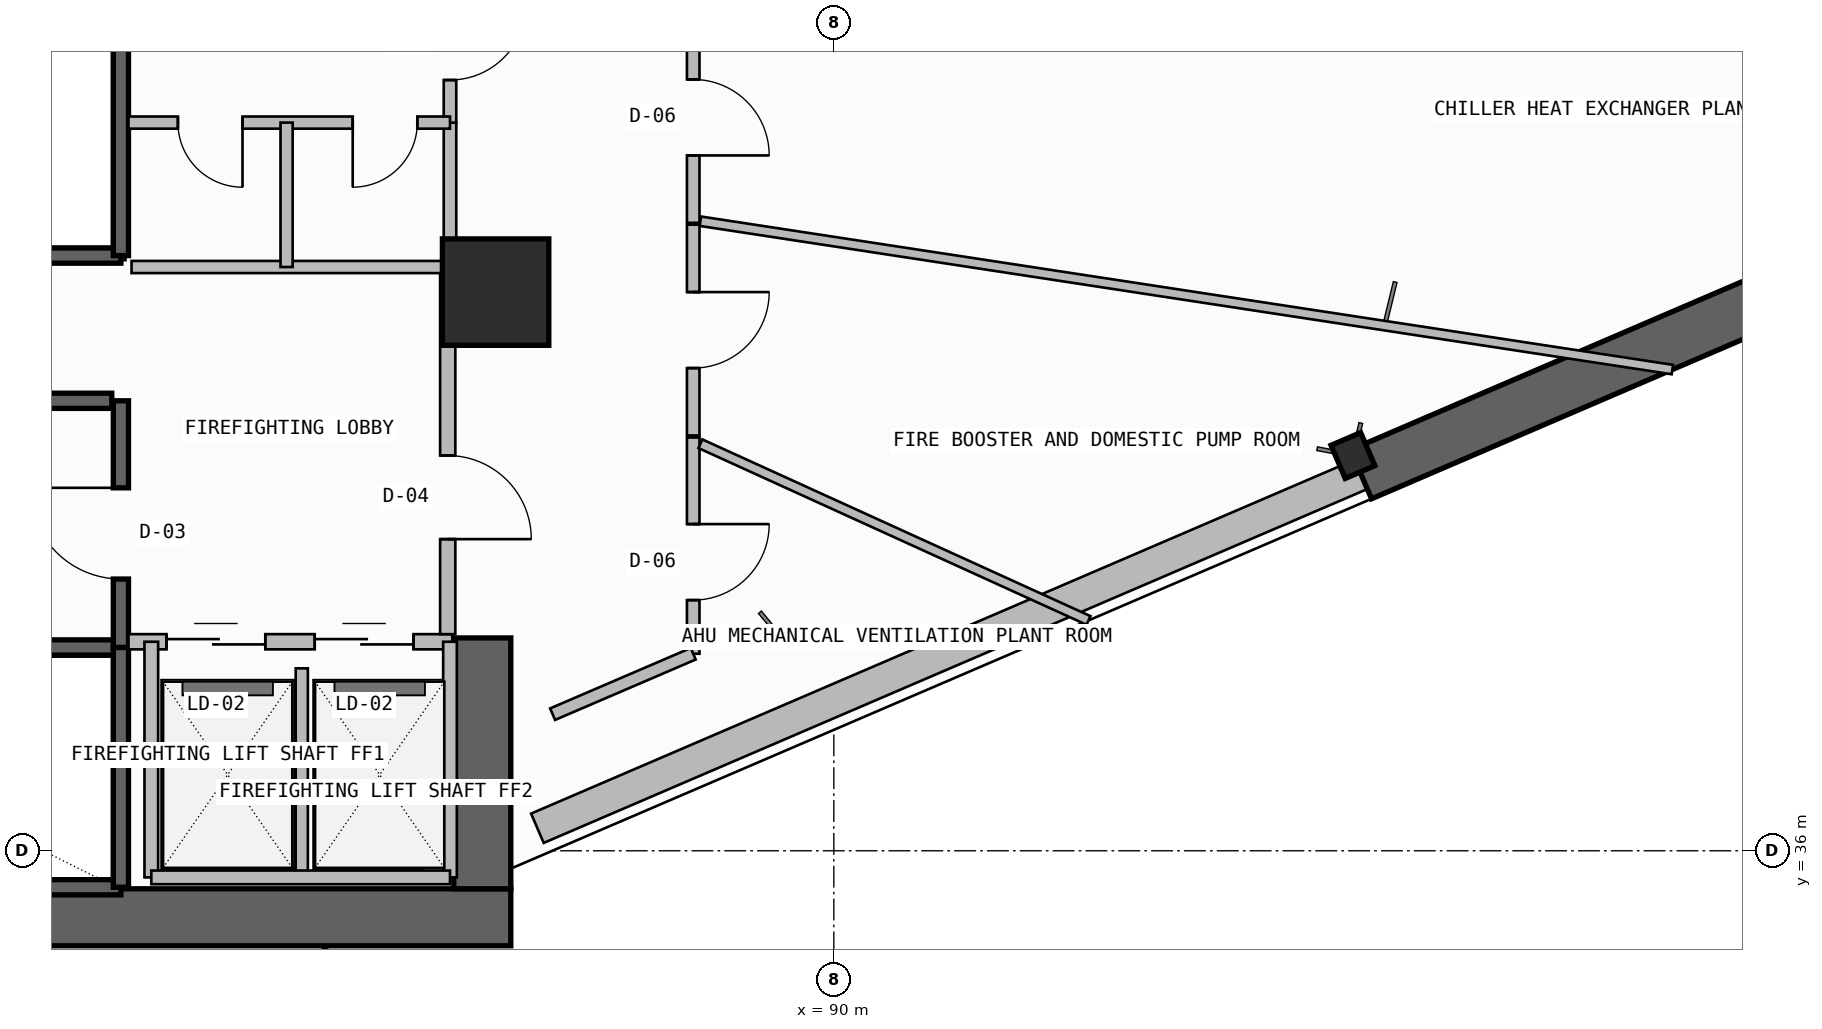
"""IFC4 building model, lengths in metres.
Left out: names, types, materials, properties, quantities, classifications, styles, units other than length and angle.
Written with IfcOpenShell. Run it as: python <this file> out.ifc"""

import sys

from ifc_helpers import new_model, si_unit, direction, frame, frame_2d, origin, origin_2d, place, context, subcontext, project, spatial, rectangle, i_section, extrude, element, fill, save


model = new_model("IFC4")
c1 = context("Model", 3, precision=1e-05, world=origin(), true_north=direction((0.0, 1.0)))
c2 = subcontext(c1, "Body", "Model", "MODEL_VIEW")
j1 = project(units=[si_unit("LENGTHUNIT", "METRE"), si_unit("PLANEANGLEUNIT", "RADIAN")], contexts=[c1])
p1 = place(None, origin())
s1 = spatial("IfcSite", under=j1, at=p1, CompositionType="ELEMENT")
p2 = place(p1, origin())
s2 = spatial("IfcBuilding", under=s1, at=p2, CompositionType="ELEMENT")
p3 = place(p2, frame((0.0, 0.0, 196.7)))
s3 = spatial("IfcBuildingStorey", under=s2, at=p3, CompositionType="ELEMENT", Elevation=196.7)
p4 = place(p3, frame((72.15, 35.125, -0.5), z_axis=(0.0, 0.0, 1.0), x_axis=(1.0, 0.0, 0.0)))
e1 = element("IfcWall", 1, at=p4, inside=s3, PredefinedType="SHEAR", context=c2, shape_type="SweptSolid", body=[
    extrude(rectangle(XDim=13.6, YDim=0.75, at=frame_2d((6.8, 0.0))), origin(), (0.0, 0.0, 1.0), 4.3),
])
p5 = place(p3, frame((85.375, 35.5, -0.5), z_axis=(0.0, 0.0, 1.0), x_axis=(0.0, 1.0, 0.0)))
e2 = element("IfcWall", 2, at=p5, inside=s3, PredefinedType="SHEAR", context=c2, shape_type="SweptSolid", body=[
    extrude(rectangle(XDim=3.3, YDim=0.75, at=frame_2d((1.65, 0.0))), origin(), (0.0, 0.0, 1.0), 4.3),
])
p6 = place(p3, frame((85.55, 43.35, 0.0), z_axis=(0.0, 0.0, 1.0), x_axis=(1.0, 0.0, 0.0)))
e3 = element("IfcColumn", 3, at=p6, inside=s3, PredefinedType="COLUMN", context=c2, shape_type="SweptSolid", body=[
    extrude(rectangle(XDim=1.4, YDim=1.4, at=origin_2d()), origin(), (0.0, 0.0, 1.0), 4.2),
])
p7 = place(p3, frame((96.83, 41.2, 0.0), z_axis=(0.0, 0.0, 1.0), x_axis=(0.918791210149, 0.394743856384, 0.0)))
e4 = element("IfcColumn", 4, at=p7, inside=s3, PredefinedType="COLUMN", context=c2, shape_type="SweptSolid", body=[
    extrude(i_section(OverallWidth=0.424, OverallDepth=0.474, WebThickness=0.048, FlangeThickness=0.077, FilletRadius=0.015, at=origin_2d()), origin(), (0.0, 0.0, 1.0), 4.2),
])
p8 = place(p3, frame((86.1, 36.296, 0.0), z_axis=(0.0, 0.0, 1.0), x_axis=(0.918792412723, 0.394741057306, 0.0)))
e5 = element("IfcWall", 5, at=p8, inside=s3, PredefinedType="SOLIDWALL", context=c2, shape_type="SweptSolid", body=[
    extrude(rectangle(XDim=11.794, YDim=0.42, at=frame_2d((5.897, 0.0))), origin(), (0.0, 0.0, 1.0), 2.777),
])
p9 = place(p3, frame((96.937, 40.952, -0.5), z_axis=(0.0, 0.0, 1.0), x_axis=(0.918782407933, 0.394764343468, 0.0)))
e6 = element("IfcWall", 6, at=p9, inside=s3, PredefinedType="SHEAR", context=c2, shape_type="SweptSolid", body=[
    extrude(rectangle(XDim=8.402, YDim=0.7, at=frame_2d((4.201, 0.0))), origin(), (0.0, 0.0, 1.0), 4.3),
])
for number, where, z_axis, x_axis in (
    (7, (72.92, 35.52, -0.5), (0.0, 0.0, 1.0), (1.0, 0.0, 0.0)),
    (8, (72.92, 38.675, -0.5), (0.0, 0.0, 1.0), (1.0, 0.0, 0.0)),
):
    element("IfcWall", number, at=place(p3, frame(where, z_axis=z_axis, x_axis=x_axis)), inside=s3, PredefinedType="SOLIDWALL", context=c2, shape_type="SweptSolid", body=[
        extrude(rectangle(XDim=7.7, YDim=0.2, at=frame_2d((3.85, 0.0))), origin(), (0.0, 0.0, 1.0), 4.3),
    ])
p10 = place(p3, frame((80.62, 35.52, -0.5), z_axis=(0.0, 0.0, 1.0), x_axis=(0.0, 1.0, 0.0)))
e9 = element("IfcWall", 9, at=p10, inside=s3, PredefinedType="SOLIDWALL", context=c2, shape_type="SweptSolid", body=[
    extrude(rectangle(XDim=3.155, YDim=0.2, at=frame_2d((1.578, 0.0))), origin(), (0.0, 0.0, 1.0), 4.3),
])
p11 = place(p3, frame((80.62, 38.675, -0.5), z_axis=(0.0, 0.0, 1.0), x_axis=(0.0, 1.0, 0.0)))
e10 = element("IfcWall", 10, at=p11, inside=s3, PredefinedType="SOLIDWALL", context=c2, shape_type="SweptSolid", body=[
    extrude(rectangle(XDim=3.245, YDim=0.2, at=frame_2d((1.623, 0.0))), origin(), (0.0, 0.0, 1.0), 4.3),
])
p12 = place(p11, frame((0.9, 0.0, 0.5)))
e11 = element("IfcOpeningElement", 11, at=p12, cuts=e10, PredefinedType="OPENING", context=c2, shape_type="SweptSolid", body=[
    extrude(rectangle(XDim=1.2, YDim=2.2, at=frame_2d((0.6, 1.1))), frame((0.0, 0.11, 0.0), z_axis=(0.0, -1.0, 0.0), x_axis=(1.0, 0.0, 0.0)), (0.0, 0.0, 1.0), 0.22),
])
p13 = place(p3, frame((80.72, 38.75, 0.0), z_axis=(0.0, 0.0, 1.0), x_axis=(1.0, 0.0, 0.0)))
e12 = element("IfcWall", 12, at=p13, inside=s3, PredefinedType="SOLIDWALL", context=c2, shape_type="SweptSolid", body=[
    extrude(rectangle(XDim=4.26, YDim=0.2, at=frame_2d((2.13, 0.0))), origin(), (0.0, 0.0, 1.0), 3.8),
])
p14 = place(p13, frame((0.5, 0.0, 0.0)))
e13 = element("IfcOpeningElement", 13, at=p14, cuts=e12, PredefinedType="OPENING", context=c2, shape_type="SweptSolid", body=[
    extrude(rectangle(XDim=1.3, YDim=2.3, at=frame_2d((0.65, 1.15))), frame((0.0, 0.11, 0.0), z_axis=(0.0, -1.0, 0.0), x_axis=(1.0, 0.0, 0.0)), (0.0, 0.0, 1.0), 0.22),
])
p15 = place(p13, frame((2.45, 0.0, 0.0)))
e14 = element("IfcOpeningElement", 14, at=p15, cuts=e12, PredefinedType="OPENING", context=c2, shape_type="SweptSolid", body=[
    extrude(rectangle(XDim=1.3, YDim=2.3, at=frame_2d((0.65, 1.15))), frame((0.0, 0.11, 0.0), z_axis=(0.0, -1.0, 0.0), x_axis=(1.0, 0.0, 0.0)), (0.0, 0.0, 1.0), 0.22),
])
p16 = place(p3, frame((83.0, 35.65, 0.0), z_axis=(0.0, 0.0, 1.0), x_axis=(0.0, 1.0, 0.0)))
e15 = element("IfcWall", 15, at=p16, inside=s3, PredefinedType="PLUMBINGWALL", context=c2, shape_type="SweptSolid", body=[
    extrude(rectangle(XDim=2.75, YDim=0.16, at=frame_2d((1.375, 0.0))), origin(), (0.0, 0.0, 1.0), 3.8),
])
for number, where, z_axis, x_axis in (
    (16, (84.95, 35.65, 0.0), (0.0, 0.0, 1.0), (0.0, 1.0, 0.0)),
    (17, (81.02, 35.65, 0.0), (0.0, 0.0, 1.0), (0.0, 1.0, 0.0)),
):
    element("IfcWall", number, at=place(p3, frame(where, z_axis=z_axis, x_axis=x_axis)), inside=s3, PredefinedType="SOLIDWALL", context=c2, shape_type="SweptSolid", body=[
        extrude(rectangle(XDim=3.1, YDim=0.18, at=frame_2d((1.55, 0.0))), origin(), (0.0, 0.0, 1.0), 3.8),
    ])
p17 = place(p3, frame((81.02, 35.65, 0.0), z_axis=(0.0, 0.0, 1.0), x_axis=(1.0, 0.0, 0.0)))
e18 = element("IfcWall", 18, at=p17, inside=s3, PredefinedType="SOLIDWALL", context=c2, shape_type="SweptSolid", body=[
    extrude(rectangle(XDim=3.93, YDim=0.18, at=frame_2d((1.965, 0.0))), origin(), (0.0, 0.0, 1.0), 3.8),
])
p18 = place(p3, frame((84.92, 38.85, 0.0), z_axis=(0.0, 0.0, 1.0), x_axis=(0.0, 1.0, 0.0)))
e19 = element("IfcWall", 19, at=p18, inside=s3, PredefinedType="SOLIDWALL", context=c2, shape_type="SweptSolid", body=[
    extrude(rectangle(XDim=4.83, YDim=0.2, at=frame_2d((2.415, 0.0))), origin(), (0.0, 0.0, 1.0), 3.8),
])
p19 = place(p18, frame((1.25, 0.0, 0.0)))
e20 = element("IfcOpeningElement", 20, at=p19, cuts=e19, PredefinedType="OPENING", context=c2, shape_type="SweptSolid", body=[
    extrude(rectangle(XDim=1.1, YDim=2.2, at=frame_2d((0.55, 1.1))), frame((0.0, 0.11, 0.0), z_axis=(0.0, -1.0, 0.0), x_axis=(1.0, 0.0, 0.0)), (0.0, 0.0, 1.0), 0.22),
])
p20 = place(p3, frame((72.92, 41.92, -0.5), z_axis=(0.0, 0.0, 1.0), x_axis=(1.0, 0.0, 0.0)))
e21 = element("IfcWall", 21, at=p20, inside=s3, PredefinedType="SOLIDWALL", context=c2, shape_type="SweptSolid", body=[
    extrude(rectangle(XDim=7.58, YDim=0.2, at=frame_2d((3.79, 0.0))), origin(), (0.0, 0.0, 1.0), 4.3),
])
p21 = place(p3, frame((72.92, 43.83, -0.5), z_axis=(0.0, 0.0, 1.0), x_axis=(1.0, 0.0, 0.0)))
e22 = element("IfcWall", 22, at=p21, inside=s3, PredefinedType="SOLIDWALL", context=c2, shape_type="SweptSolid", body=[
    extrude(rectangle(XDim=7.7, YDim=0.2, at=frame_2d((3.85, 0.0))), origin(), (0.0, 0.0, 1.0), 4.3),
])
p22 = place(p3, frame((80.62, 43.83, -0.5), z_axis=(0.0, 0.0, 1.0), x_axis=(0.0, 1.0, 0.0)))
e23 = element("IfcWall", 23, at=p22, inside=s3, PredefinedType="SOLIDWALL", context=c2, shape_type="SweptSolid", body=[
    extrude(rectangle(XDim=3.24, YDim=0.2, at=frame_2d((1.62, 0.0))), origin(), (0.0, 0.0, 1.0), 4.3),
])
p23 = place(p3, frame((84.95, 43.68, 0.0), z_axis=(0.0, 0.0, 1.0), x_axis=(0.0, 1.0, 0.0)))
e24 = element("IfcWall", 24, at=p23, inside=s3, PredefinedType="PLUMBINGWALL", context=c2, shape_type="SweptSolid", body=[
    extrude(rectangle(XDim=1.9, YDim=0.165, at=frame_2d((0.95, 0.0))), origin(), (0.0, 0.0, 1.0), 3.8),
])
p24 = place(p3, frame((84.95, 45.58, 0.0), z_axis=(0.0, 0.0, 1.0), x_axis=(0.0, 1.0, 0.0)))
e25 = element("IfcWall", 25, at=p24, inside=s3, PredefinedType="PARTITIONING", context=c2, shape_type="SweptSolid", body=[
    extrude(rectangle(XDim=2.12, YDim=0.165, at=frame_2d((1.06, 0.0))), origin(), (0.0, 0.0, 1.0), 3.8),
])
p25 = place(p24, frame((0.56, 0.0, 0.0)))
e26 = element("IfcOpeningElement", 26, at=p25, cuts=e25, PredefinedType="OPENING", context=c2, shape_type="SweptSolid", body=[
    extrude(rectangle(XDim=1.0, YDim=2.2, at=frame_2d((0.5, 1.1))), frame((0.0, 0.093, 0.0), z_axis=(0.0, -1.0, 0.0), x_axis=(1.0, 0.0, 0.0)), (0.0, 0.0, 1.0), 0.185),
])
p26 = place(p3, frame((80.72, 45.58, 0.0), z_axis=(0.0, 0.0, 1.0), x_axis=(1.0, 0.0, 0.0)))
e27 = element("IfcWall", 27, at=p26, inside=s3, PredefinedType="PLUMBINGWALL", context=c2, shape_type="SweptSolid", body=[
    extrude(rectangle(XDim=4.23, YDim=0.16, at=frame_2d((2.115, 0.0))), origin(), (0.0, 0.0, 1.0), 3.8),
])
p27 = place(p26, frame((0.65, 0.0, 0.0)))
e28 = element("IfcOpeningElement", 28, at=p27, cuts=e27, PredefinedType="OPENING", context=c2, shape_type="SweptSolid", body=[
    extrude(rectangle(XDim=0.85, YDim=2.05, at=frame_2d((0.425, 1.025))), frame((0.0, 0.09, 0.0), z_axis=(0.0, -1.0, 0.0), x_axis=(1.0, 0.0, 0.0)), (0.0, 0.0, 1.0), 0.18),
])
p28 = place(p26, frame((2.95, 0.0, 0.0)))
e29 = element("IfcOpeningElement", 29, at=p28, cuts=e27, PredefinedType="OPENING", context=c2, shape_type="SweptSolid", body=[
    extrude(rectangle(XDim=0.85, YDim=2.05, at=frame_2d((0.425, 1.025))), frame((0.0, 0.09, 0.0), z_axis=(0.0, -1.0, 0.0), x_axis=(1.0, 0.0, 0.0)), (0.0, 0.0, 1.0), 0.18),
])
p29 = place(p3, frame((80.76, 43.68, 0.0), z_axis=(0.0, 0.0, 1.0), x_axis=(1.0, 0.0, 0.0)))
e30 = element("IfcWall", 30, at=p29, inside=s3, PredefinedType="PLUMBINGWALL", context=c2, shape_type="SweptSolid", body=[
    extrude(rectangle(XDim=4.19, YDim=0.16, at=frame_2d((2.095, 0.0))), origin(), (0.0, 0.0, 1.0), 3.8),
])
p30 = place(p3, frame((82.8, 43.68, 0.0), z_axis=(0.0, 0.0, 1.0), x_axis=(0.0, 1.0, 0.0)))
e31 = element("IfcWall", 31, at=p30, inside=s3, PredefinedType="PLUMBINGWALL", context=c2, shape_type="SweptSolid", body=[
    extrude(rectangle(XDim=1.9, YDim=0.16, at=frame_2d((0.95, 0.0))), origin(), (0.0, 0.0, 1.0), 3.8),
])
p31 = place(p3, frame((88.15, 38.592, 0.0), z_axis=(0.0, 0.0, 1.0), x_axis=(0.0, 1.0, 0.0)))
e32 = element("IfcWall", 32, at=p31, inside=s3, PredefinedType="PARTITIONING", context=c2, shape_type="SweptSolid", body=[
    extrude(rectangle(XDim=2.845, YDim=0.165, at=frame_2d((1.423, 0.0))), origin(), (0.0, 0.0, 1.0), 2.777),
])
p32 = place(p31, frame((0.706, 0.0, 0.0)))
e33 = element("IfcOpeningElement", 33, at=p32, cuts=e32, PredefinedType="OPENING", context=c2, shape_type="SweptSolid", body=[
    extrude(rectangle(XDim=1.0, YDim=2.2, at=frame_2d((0.5, 1.1))), frame((0.0, 0.093, 0.0), z_axis=(0.0, -1.0, 0.0), x_axis=(1.0, 0.0, 0.0)), (0.0, 0.0, 1.0), 0.185),
])
p33 = place(p3, frame((86.3, 37.797, 0.0), z_axis=(0.0, 0.0, 1.0), x_axis=(0.918805991545, 0.394709449977, 0.0)))
e34 = element("IfcWall", 34, at=p33, inside=s3, PredefinedType="PARTITIONING", context=c2, shape_type="SweptSolid", body=[
    extrude(rectangle(XDim=2.013, YDim=0.165, at=frame_2d((1.007, 0.0))), origin(), (0.0, 0.0, 1.0), 3.8),
])
p34 = place(p3, frame((88.244, 41.355, 0.0), z_axis=(0.0, 0.0, 1.0), x_axis=(0.910133851889, -0.414314339175, 0.0)))
e35 = element("IfcWall", 35, at=p34, inside=s3, PredefinedType="PARTITIONING", context=c2, shape_type="SweptSolid", body=[
    extrude(rectangle(XDim=5.61, YDim=0.125, at=frame_2d((2.805, 0.0))), origin(), (0.0, 0.0, 1.0), 2.777),
])
p35 = place(p3, frame((88.15, 44.261, 0.0), z_axis=(0.0, 0.0, 1.0), x_axis=(0.0, 1.0, 0.0)))
e36 = element("IfcWall", 36, at=p35, inside=s3, PredefinedType="PARTITIONING", context=c2, shape_type="SweptSolid", body=[
    extrude(rectangle(XDim=2.773, YDim=0.165, at=frame_2d((1.387, 0.0))), origin(), (0.0, 0.0, 1.0), 3.8),
])
p36 = place(p35, frame((0.887, 0.0, 0.0)))
e37 = element("IfcOpeningElement", 37, at=p36, cuts=e36, PredefinedType="OPENING", context=c2, shape_type="SweptSolid", body=[
    extrude(rectangle(XDim=1.0, YDim=2.2, at=frame_2d((0.5, 1.1))), frame((0.0, 0.093, 0.0), z_axis=(0.0, -1.0, 0.0), x_axis=(1.0, 0.0, 0.0)), (0.0, 0.0, 1.0), 0.185),
])
p37 = place(p3, frame((101.033, 42.331, 0.0), z_axis=(0.0, 0.0, 1.0), x_axis=(-0.988557493013, 0.150844565722, 0.0)))
e38 = element("IfcWall", 38, at=p37, inside=s3, PredefinedType="PARTITIONING", context=c2, shape_type="SweptSolid", body=[
    extrude(rectangle(XDim=12.937, YDim=0.125, at=frame_2d((6.468, 0.0))), origin(), (0.0, 0.0, 1.0), 2.777),
])
p38 = place(p3, frame((88.15, 41.464, 0.0), z_axis=(0.0, 0.0, 1.0), x_axis=(0.0, 1.0, 0.0)))
e39 = element("IfcWall", 39, at=p38, inside=s3, PredefinedType="PARTITIONING", context=c2, shape_type="SweptSolid", body=[
    extrude(rectangle(XDim=2.773, YDim=0.165, at=frame_2d((1.387, 0.0))), origin(), (0.0, 0.0, 1.0), 2.777),
])
p39 = place(p38, frame((0.887, 0.0, 0.0)))
e40 = element("IfcOpeningElement", 40, at=p39, cuts=e39, PredefinedType="OPENING", context=c2, shape_type="SweptSolid", body=[
    extrude(rectangle(XDim=1.0, YDim=2.2, at=frame_2d((0.5, 1.1))), frame((0.0, 0.093, 0.0), z_axis=(0.0, -1.0, 0.0), x_axis=(1.0, 0.0, 0.0)), (0.0, 0.0, 1.0), 0.185),
])
p40 = place(p12, origin())
e41 = element("IfcDoor", 41, at=p40, inside=s3, OperationType="SINGLE_SWING_RIGHT", PredefinedType="USERDEFINED", context=c2, shape_type="SweptSolid", body=[
    extrude(rectangle(XDim=1.2, YDim=2.2, at=frame_2d((0.6, 1.1))), frame((0.0, 0.025, 0.0), z_axis=(0.0, -1.0, 0.0), x_axis=(1.0, 0.0, 0.0)), (0.0, 0.0, 1.0), 0.05),
])
fill(e11, e41)
p41 = place(p14, origin())
e42 = element("IfcDoor", 42, at=p41, inside=s3, OperationType="DOUBLE_DOOR_SLIDING", PredefinedType="DOOR", context=c2, shape_type="SweptSolid", body=[
    extrude(rectangle(XDim=1.3, YDim=2.3, at=frame_2d((0.65, 1.15))), frame((0.0, 0.025, 0.0), z_axis=(0.0, -1.0, 0.0), x_axis=(1.0, 0.0, 0.0)), (0.0, 0.0, 1.0), 0.05),
])
fill(e13, e42)
p42 = place(p15, origin())
e43 = element("IfcDoor", 43, at=p42, inside=s3, OperationType="DOUBLE_DOOR_SLIDING", PredefinedType="DOOR", context=c2, shape_type="SweptSolid", body=[
    extrude(rectangle(XDim=1.3, YDim=2.3, at=frame_2d((0.65, 1.15))), frame((0.0, 0.025, 0.0), z_axis=(0.0, -1.0, 0.0), x_axis=(1.0, 0.0, 0.0)), (0.0, 0.0, 1.0), 0.05),
])
fill(e14, e43)
p43 = place(p19, frame((1.1, 0.0, 0.0), z_axis=(0.0, 0.0, 1.0), x_axis=(-1.0, 0.0, 0.0)))
e44 = element("IfcDoor", 44, at=p43, inside=s3, OperationType="SINGLE_SWING_RIGHT", PredefinedType="DOOR", context=c2, shape_type="SweptSolid", body=[
    extrude(rectangle(XDim=1.1, YDim=2.2, at=frame_2d((0.55, 1.1))), frame((0.0, 0.025, 0.0), z_axis=(0.0, -1.0, 0.0), x_axis=(1.0, 0.0, 0.0)), (0.0, 0.0, 1.0), 0.05),
])
fill(e20, e44)
p44 = place(p25, frame((1.0, 0.0, 0.0), z_axis=(0.0, 0.0, 1.0), x_axis=(-1.0, 0.0, 0.0)))
e45 = element("IfcDoor", 45, at=p44, inside=s3, OperationType="SINGLE_SWING_LEFT", PredefinedType="DOOR", context=c2, shape_type="SweptSolid", body=[
    extrude(rectangle(XDim=1.0, YDim=2.2, at=frame_2d((0.5, 1.1))), frame((0.0, 0.025, 0.0), z_axis=(0.0, -1.0, 0.0), x_axis=(1.0, 0.0, 0.0)), (0.0, 0.0, 1.0), 0.05),
])
fill(e26, e45)
p45 = place(p27, frame((0.85, 0.0, 0.0), z_axis=(0.0, 0.0, 1.0), x_axis=(-1.0, 0.0, 0.0)))
e46 = element("IfcDoor", 46, at=p45, inside=s3, OperationType="SINGLE_SWING_LEFT", PredefinedType="DOOR", context=c2, shape_type="SweptSolid", body=[
    extrude(rectangle(XDim=0.85, YDim=2.05, at=frame_2d((0.425, 1.025))), frame((0.0, 0.025, 0.0), z_axis=(0.0, -1.0, 0.0), x_axis=(1.0, 0.0, 0.0)), (0.0, 0.0, 1.0), 0.05),
])
fill(e28, e46)
p46 = place(p28, frame((0.85, 0.0, 0.0), z_axis=(0.0, 0.0, 1.0), x_axis=(-1.0, 0.0, 0.0)))
e47 = element("IfcDoor", 47, at=p46, inside=s3, OperationType="SINGLE_SWING_RIGHT", PredefinedType="DOOR", context=c2, shape_type="SweptSolid", body=[
    extrude(rectangle(XDim=0.85, YDim=2.05, at=frame_2d((0.425, 1.025))), frame((0.0, 0.025, 0.0), z_axis=(0.0, -1.0, 0.0), x_axis=(1.0, 0.0, 0.0)), (0.0, 0.0, 1.0), 0.05),
])
fill(e29, e47)
p47 = place(p32, frame((1.0, 0.0, 0.0), z_axis=(0.0, 0.0, 1.0), x_axis=(-1.0, 0.0, 0.0)))
e48 = element("IfcDoor", 48, at=p47, inside=s3, OperationType="SINGLE_SWING_LEFT", PredefinedType="DOOR", context=c2, shape_type="SweptSolid", body=[
    extrude(rectangle(XDim=1.0, YDim=2.2, at=frame_2d((0.5, 1.1))), frame((0.0, 0.025, 0.0), z_axis=(0.0, -1.0, 0.0), x_axis=(1.0, 0.0, 0.0)), (0.0, 0.0, 1.0), 0.05),
])
fill(e33, e48)
p48 = place(p36, frame((1.0, 0.0, 0.0), z_axis=(0.0, 0.0, 1.0), x_axis=(-1.0, 0.0, 0.0)))
e49 = element("IfcDoor", 49, at=p48, inside=s3, OperationType="SINGLE_SWING_RIGHT", PredefinedType="DOOR", context=c2, shape_type="SweptSolid", body=[
    extrude(rectangle(XDim=1.0, YDim=2.2, at=frame_2d((0.5, 1.1))), frame((0.0, 0.025, 0.0), z_axis=(0.0, -1.0, 0.0), x_axis=(1.0, 0.0, 0.0)), (0.0, 0.0, 1.0), 0.05),
])
fill(e37, e49)
p49 = place(p39, frame((1.0, 0.0, 0.0), z_axis=(0.0, 0.0, 1.0), x_axis=(-1.0, 0.0, 0.0)))
e50 = element("IfcDoor", 50, at=p49, inside=s3, OperationType="SINGLE_SWING_LEFT", PredefinedType="DOOR", context=c2, shape_type="SweptSolid", body=[
    extrude(rectangle(XDim=1.0, YDim=2.2, at=frame_2d((0.5, 1.1))), frame((0.0, 0.025, 0.0), z_axis=(0.0, -1.0, 0.0), x_axis=(1.0, 0.0, 0.0)), (0.0, 0.0, 1.0), 0.05),
])
fill(e40, e50)
save(model, sys.argv[1])
